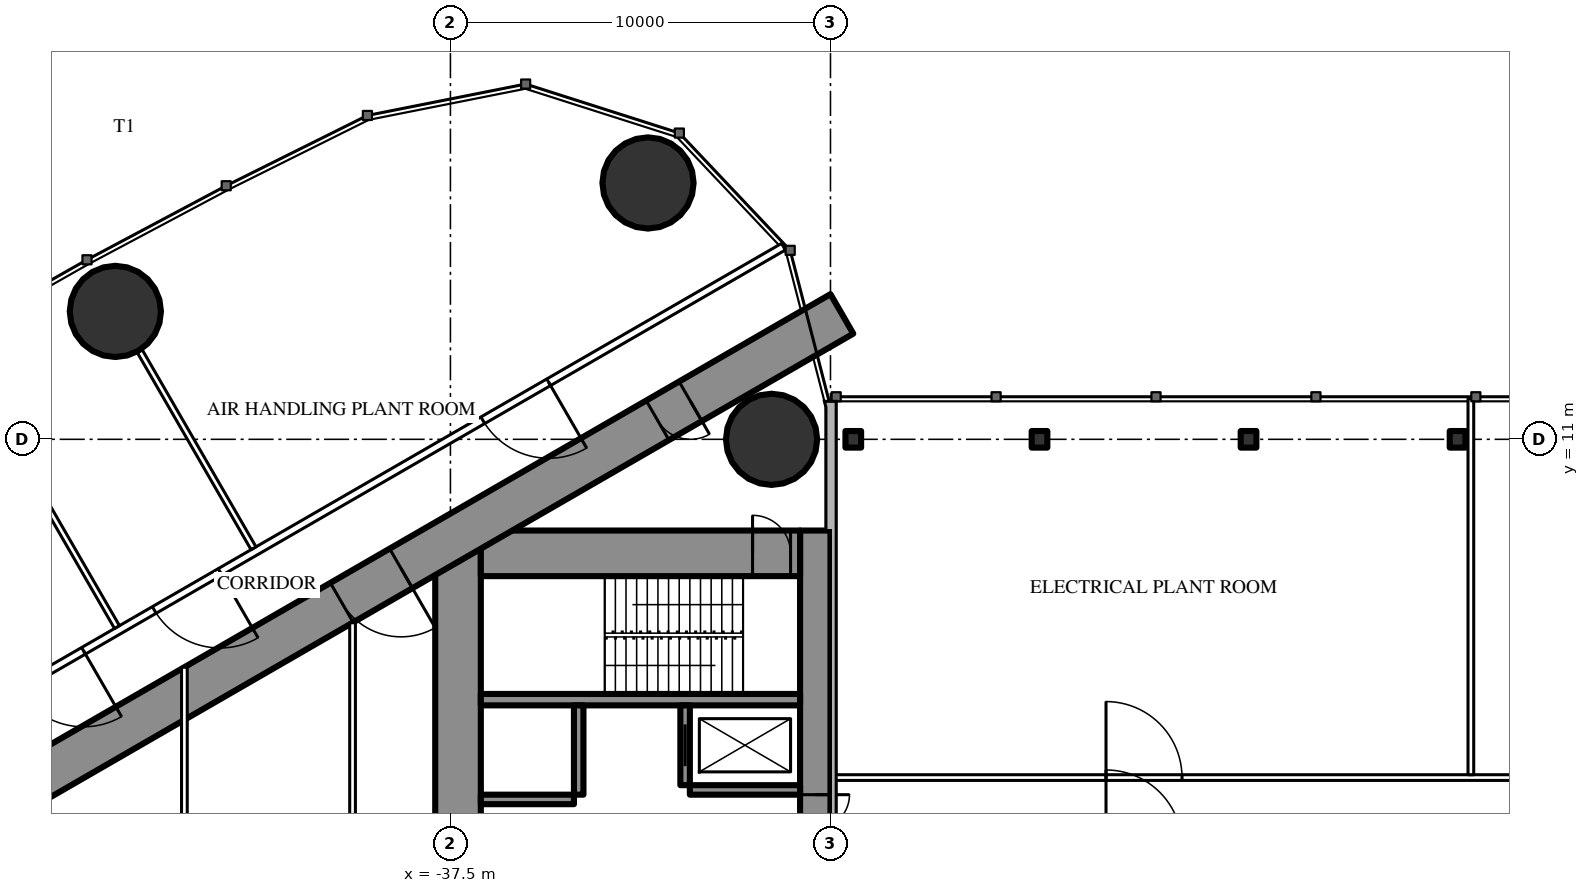
"""IFC4 building model, lengths in metres.
Left out: names, types, materials, properties, quantities, classifications, styles, units other than length and angle.
Written with IfcOpenShell. Run it as: python <this file> out.ifc"""

import sys

from ifc_helpers import new_model, si_unit, direction, frame, frame_2d, origin, origin_2d, place, context, subcontext, project, spatial, rectangle, circle, i_section, extrude, element, fill, save


model = new_model("IFC4")
c1 = context("Model", 3, precision=1e-05, world=origin(), true_north=direction((0.0, 1.0)))
c2 = subcontext(c1, "Body", "Model", "MODEL_VIEW")
j1 = project(units=[si_unit("LENGTHUNIT", "METRE"), si_unit("PLANEANGLEUNIT", "RADIAN")], contexts=[c1])
p1 = place(None, origin())
s1 = spatial("IfcSite", under=j1, at=p1, CompositionType="ELEMENT")
p2 = place(p1, origin())
s2 = spatial("IfcBuilding", under=s1, at=p2, CompositionType="ELEMENT")
p3 = place(p2, frame((0.0, 0.0, 263.3)))
s3 = spatial("IfcBuildingStorey", under=s2, at=p3, CompositionType="ELEMENT", Elevation=263.3)
for number, where, z_axis, x_axis in (
    (1, (-32.301, 17.745, 0.0), (0.0, 0.0, 1.0), (1.0, 0.0, 0.0)),
    (2, (-29.05, 11.0, 0.0), (0.0, 0.0, 1.0), (1.0, 0.0, 0.0)),
    (3, (-46.317, 14.365, 0.0), (0.0, 0.0, 1.0), (1.0, 0.0, 0.0)),
):
    element("IfcColumn", number, at=place(p3, frame(where, z_axis=z_axis, x_axis=x_axis)), inside=s3, PredefinedType="COLUMN", context=c2, shape_type="SweptSolid", body=[
        extrude(circle(Radius=1.2, at=origin_2d()), origin(), (0.0, 0.0, 1.0), 5.0),
    ])
p4 = place(p3, frame((-27.9, 8.6, 0.0), z_axis=(0.0, 0.0, 1.0), x_axis=(0.0, -1.0, 0.0)))
e4 = element("IfcWall", 4, at=p4, inside=s3, PredefinedType="SHEAR", context=c2, shape_type="SweptSolid", body=[
    extrude(rectangle(XDim=17.2, YDim=0.8, at=frame_2d((8.6, 0.0))), origin(), (0.0, 0.0, 1.0), 5.0),
])
p5 = place(p4, frame((6.95, 0.0, 0.0)))
e5 = element("IfcOpeningElement", 5, at=p5, cuts=e4, PredefinedType="OPENING", context=c2, shape_type="SweptSolid", body=[
    extrude(rectangle(XDim=0.9, YDim=2.2, at=frame_2d((0.45, 1.1))), frame((0.0, 0.41, 0.0), z_axis=(0.0, -1.0, 0.0), x_axis=(1.0, 0.0, 0.0)), (0.0, 0.0, 1.0), 0.82),
])
p6 = place(p3, frame((-37.3, 8.6, 0.0), z_axis=(0.0, 0.0, 1.0), x_axis=(0.0, -1.0, 0.0)))
e6 = element("IfcWall", 6, at=p6, inside=s3, PredefinedType="SHEAR", context=c2, shape_type="SweptSolid", body=[
    extrude(rectangle(XDim=17.2, YDim=1.2, at=frame_2d((8.6, 0.0))), origin(), (0.0, 0.0, 1.0), 5.0),
])
p7 = place(p6, frame((7.7, 0.0, 0.0)))
e7 = element("IfcOpeningElement", 7, at=p7, cuts=e6, PredefinedType="OPENING", context=c2, shape_type="SweptSolid", body=[
    extrude(rectangle(XDim=1.8, YDim=2.2, at=frame_2d((0.9, 1.1))), frame((0.0, 0.61, 0.0), z_axis=(0.0, -1.0, 0.0), x_axis=(1.0, 0.0, 0.0)), (0.0, 0.0, 1.0), 1.22),
])
p8 = place(p3, frame((-28.3, 8.0, 0.0), z_axis=(0.0, 0.0, 1.0), x_axis=(-1.0, 0.0, 0.0)))
e8 = element("IfcWall", 8, at=p8, inside=s3, PredefinedType="SHEAR", context=c2, shape_type="SweptSolid", body=[
    extrude(rectangle(XDim=8.4, YDim=1.2, at=frame_2d((4.2, 0.0))), origin(), (0.0, 0.0, 1.0), 5.0),
])
p9 = place(p8, frame((0.25, 0.0, 0.0)))
e9 = element("IfcOpeningElement", 9, at=p9, cuts=e8, PredefinedType="OPENING", context=c2, shape_type="SweptSolid", body=[
    extrude(rectangle(XDim=1.0, YDim=2.2, at=frame_2d((0.5, 1.1))), frame((0.0, 0.61, 0.0), z_axis=(0.0, -1.0, 0.0), x_axis=(1.0, 0.0, 0.0)), (0.0, 0.0, 1.0), 1.22),
])
p10 = place(p3, frame((-28.3, 4.15, 0.0), z_axis=(0.0, 0.0, 1.0), x_axis=(-1.0, 0.0, 0.0)))
e10 = element("IfcWall", 10, at=p10, inside=s3, PredefinedType="SHEAR", context=c2, shape_type="SweptSolid", body=[
    extrude(rectangle(XDim=8.4, YDim=0.3, at=frame_2d((4.2, 0.0))), origin(), (0.0, 0.0, 1.0), 5.0),
])
p11 = place(p3, frame((-31.325, 4.0, 0.0), z_axis=(0.0, 0.0, 1.0), x_axis=(0.0, -1.0, 0.0)))
e11 = element("IfcWall", 11, at=p11, inside=s3, PredefinedType="SHEAR", context=c2, shape_type="SweptSolid", body=[
    extrude(rectangle(XDim=2.1, YDim=0.25, at=frame_2d((1.05, 0.0))), origin(), (0.0, 0.0, 1.0), 5.0),
])
p12 = place(p11, frame((0.5, 0.0, 0.0)))
e12 = element("IfcOpeningElement", 12, at=p12, cuts=e11, PredefinedType="OPENING", context=c2, shape_type="SweptSolid", body=[
    extrude(rectangle(XDim=1.1, YDim=2.2, at=frame_2d((0.55, 1.1))), frame((0.0, 0.135, 0.0), z_axis=(0.0, -1.0, 0.0), x_axis=(1.0, 0.0, 0.0)), (0.0, 0.0, 1.0), 0.27),
])
p13 = place(p3, frame((-34.125, 4.0, 0.0), z_axis=(0.0, 0.0, 1.0), x_axis=(0.0, -1.0, 0.0)))
e13 = element("IfcWall", 13, at=p13, inside=s3, PredefinedType="SHEAR", context=c2, shape_type="SweptSolid", body=[
    extrude(rectangle(XDim=2.35, YDim=0.25, at=frame_2d((1.175, 0.0))), origin(), (0.0, 0.0, 1.0), 5.0),
])
p14 = place(p3, frame((-28.3, 1.775, 0.0), z_axis=(0.0, 0.0, 1.0), x_axis=(-1.0, 0.0, 0.0)))
e14 = element("IfcWall", 14, at=p14, inside=s3, PredefinedType="SHEAR", context=c2, shape_type="SweptSolid", body=[
    extrude(rectangle(XDim=2.9, YDim=0.25, at=frame_2d((1.45, 0.0))), origin(), (0.0, 0.0, 1.0), 5.0),
])
p15 = place(p3, frame((-34.25, 1.525, 0.0), z_axis=(0.0, 0.0, 1.0), x_axis=(-1.0, 0.0, 0.0)))
e15 = element("IfcWall", 15, at=p15, inside=s3, PredefinedType="SHEAR", context=c2, shape_type="SweptSolid", body=[
    extrude(rectangle(XDim=2.45, YDim=0.25, at=frame_2d((1.225, 0.0))), origin(), (0.0, 0.0, 1.0), 5.0),
])
p16 = place(p3, frame((-27.2, 14.3, 0.0), z_axis=(0.0, 0.0, 1.0), x_axis=(-0.866026593062, -0.499997940104, 0.0)))
e16 = element("IfcWall", 16, at=p16, inside=s3, PredefinedType="SHEAR", context=c2, shape_type="SweptSolid", body=[
    extrude(rectangle(XDim=28.946, YDim=1.2, at=frame_2d((14.473, 0.0))), origin(), (0.0, 0.0, 1.0), 5.0),
])
p17 = place(p16, frame((4.6, 0.0, 0.0)))
e17 = element("IfcOpeningElement", 17, at=p17, cuts=e16, PredefinedType="OPENING", context=c2, shape_type="SweptSolid", body=[
    extrude(rectangle(XDim=1.0, YDim=2.2, at=frame_2d((0.5, 1.1))), frame((0.0, 0.61, 0.0), z_axis=(0.0, -1.0, 0.0), x_axis=(1.0, 0.0, 0.0)), (0.0, 0.0, 1.0), 1.22),
])
p18 = place(p16, frame((13.395, 0.0, 0.0)))
e18 = element("IfcOpeningElement", 18, at=p18, cuts=e16, PredefinedType="OPENING", context=c2, shape_type="SweptSolid", body=[
    extrude(rectangle(XDim=1.8, YDim=2.2, at=frame_2d((0.9, 1.1))), frame((0.0, 0.61, 0.0), z_axis=(0.0, -1.0, 0.0), x_axis=(1.0, 0.0, 0.0)), (0.0, 0.0, 1.0), 1.22),
])
for number, where, z_axis, x_axis in (
    (19, (-26.9, 11.0, 0.0), (0.0, 0.0, 1.0), (1.0, 0.0, 0.0)),
    (20, (-22.0, 11.0, 0.0), (0.0, 0.0, 1.0), (1.0, 0.0, 0.0)),
    (21, (-16.5, 11.0, 0.0), (0.0, 0.0, 1.0), (1.0, 0.0, 0.0)),
    (22, (-11.0, 11.0, 0.0), (0.0, 0.0, 1.0), (1.0, 0.0, 0.0)),
):
    element("IfcColumn", number, at=place(p3, frame(where, z_axis=z_axis, x_axis=x_axis)), inside=s3, PredefinedType="COLUMN", context=c2, shape_type="SweptSolid", body=[
        extrude(i_section(OverallWidth=0.412, OverallDepth=0.437, WebThickness=0.036, FlangeThickness=0.058, FilletRadius=0.015, at=origin_2d()), origin(), (0.0, 0.0, 1.0), 5.0),
    ])
p19 = place(p3, frame((-28.737, 16.068, 0.0), z_axis=(0.0, 0.0, 1.0), x_axis=(-0.866026057212, -0.499998868229, 0.0)))
e23 = element("IfcWall", 23, at=p19, inside=s3, PredefinedType="PARTITIONING", context=c2, shape_type="SweptSolid", body=[
    extrude(rectangle(XDim=32.137, YDim=0.2, at=frame_2d((16.068, 0.0))), origin(), (0.0, 0.0, 1.0), 4.75),
])
p20 = place(p19, frame((7.134, 0.0, 0.0)))
e24 = element("IfcOpeningElement", 24, at=p20, cuts=e23, PredefinedType="OPENING", context=c2, shape_type="SweptSolid", body=[
    extrude(rectangle(XDim=2.0, YDim=2.4, at=frame_2d((1.0, 1.2))), frame((0.0, 0.11, 0.0), z_axis=(0.0, -1.0, 0.0), x_axis=(1.0, 0.0, 0.0)), (0.0, 0.0, 1.0), 0.22),
])
p21 = place(p19, frame((17.117, 0.0, 0.0)))
e25 = element("IfcOpeningElement", 25, at=p21, cuts=e23, PredefinedType="OPENING", context=c2, shape_type="SweptSolid", body=[
    extrude(rectangle(XDim=2.0, YDim=2.4, at=frame_2d((1.0, 1.2))), frame((0.0, 0.11, 0.0), z_axis=(0.0, -1.0, 0.0), x_axis=(1.0, 0.0, 0.0)), (0.0, 0.0, 1.0), 0.22),
])
p22 = place(p19, frame((21.266, 0.0, 0.0)))
e26 = element("IfcOpeningElement", 26, at=p22, cuts=e23, PredefinedType="OPENING", context=c2, shape_type="SweptSolid", body=[
    extrude(rectangle(XDim=2.0, YDim=2.4, at=frame_2d((1.0, 1.2))), frame((0.0, 0.11, 0.0), z_axis=(0.0, -1.0, 0.0), x_axis=(1.0, 0.0, 0.0)), (0.0, 0.0, 1.0), 0.22),
])
p23 = place(p19, frame((27.126, 0.0, 0.0)))
e27 = element("IfcOpeningElement", 27, at=p23, cuts=e23, PredefinedType="OPENING", context=c2, shape_type="SweptSolid", body=[
    extrude(rectangle(XDim=2.0, YDim=2.4, at=frame_2d((1.0, 1.2))), frame((0.0, 0.11, 0.0), z_axis=(0.0, -1.0, 0.0), x_axis=(1.0, 0.0, 0.0)), (0.0, 0.0, 1.0), 0.22),
])
p24 = place(p3, frame((-42.68, 8.134, 0.0), z_axis=(0.0, 0.0, 1.0), x_axis=(-0.499984479505, 0.866034364361, 0.0)))
e28 = element("IfcWall", 28, at=p24, inside=s3, PredefinedType="PARTITIONING", context=c2, shape_type="SweptSolid", body=[
    extrude(rectangle(XDim=5.995, YDim=0.15, at=frame_2d((2.998, 0.0))), origin(), (0.0, 0.0, 1.0), 3.85),
])
p25 = place(p3, frame((-46.274, 6.059, 0.0), z_axis=(0.0, 0.0, 1.0), x_axis=(-0.500020471368, 0.866013584312, 0.0)))
e29 = element("IfcWall", 29, at=p25, inside=s3, PredefinedType="PARTITIONING", context=c2, shape_type="SweptSolid", body=[
    extrude(rectangle(XDim=6.028, YDim=0.15, at=frame_2d((3.014, 0.0))), origin(), (0.0, 0.0, 1.0), 3.85),
])
p26 = place(p3, frame((-40.075, 6.174, 0.0), z_axis=(0.0, 0.0, 1.0), x_axis=(0.0, -1.0, 0.0)))
e30 = element("IfcWall", 30, at=p26, inside=s3, PredefinedType="PARTITIONING", context=c2, shape_type="SweptSolid", body=[
    extrude(rectangle(XDim=12.348, YDim=0.15, at=frame_2d((6.174, 0.0))), origin(), (0.0, 0.0, 1.0), 4.75),
])
p27 = place(p26, frame((5.274, 0.0, 0.0)))
e31 = element("IfcOpeningElement", 31, at=p27, cuts=e30, PredefinedType="OPENING", context=c2, shape_type="SweptSolid", body=[
    extrude(rectangle(XDim=1.8, YDim=2.2, at=frame_2d((0.9, 1.1))), frame((0.0, 0.085, 0.0), z_axis=(0.0, -1.0, 0.0), x_axis=(1.0, 0.0, 0.0)), (0.0, 0.0, 1.0), 0.17),
])
p28 = place(p3, frame((-44.5, 5.005, 0.0), z_axis=(0.0, 0.0, 1.0), x_axis=(0.0, -1.0, 0.0)))
e32 = element("IfcWall", 32, at=p28, inside=s3, PredefinedType="PARTITIONING", context=c2, shape_type="SweptSolid", body=[
    extrude(rectangle(XDim=10.009, YDim=0.15, at=frame_2d((5.005, 0.0))), origin(), (0.0, 0.0, 1.0), 3.9),
])
p29 = place(p28, frame((4.505, 0.0, 0.0)))
e33 = element("IfcOpeningElement", 33, at=p29, cuts=e32, PredefinedType="OPENING", context=c2, shape_type="SweptSolid", body=[
    extrude(rectangle(XDim=1.0, YDim=2.2, at=frame_2d((0.5, 1.1))), frame((0.0, 0.085, 0.0), z_axis=(0.0, -1.0, 0.0), x_axis=(1.0, 0.0, 0.0)), (0.0, 0.0, 1.0), 0.17),
])
p30 = place(p3, frame((-27.5, 2.1, 0.0), z_axis=(0.0, 0.0, 1.0), x_axis=(1.0, 0.0, 0.0)))
e34 = element("IfcWall", 34, at=p30, inside=s3, PredefinedType="PARTITIONING", context=c2, shape_type="SweptSolid", body=[
    extrude(rectangle(XDim=55.0, YDim=0.15, at=frame_2d((27.5, 0.0))), origin(), (0.0, 0.0, 1.0), 4.8),
])
p31 = place(p30, frame((7.25, 0.0, 0.0)))
e35 = element("IfcOpeningElement", 35, at=p31, cuts=e34, PredefinedType="OPENING", context=c2, shape_type="SweptSolid", body=[
    extrude(rectangle(XDim=2.0, YDim=2.4, at=frame_2d((1.0, 1.2))), frame((0.0, 0.085, 0.0), z_axis=(0.0, -1.0, 0.0), x_axis=(1.0, 0.0, 0.0)), (0.0, 0.0, 1.0), 0.17),
])
p32 = place(p30, frame((29.25, 0.0, 0.0)))
e36 = element("IfcOpeningElement", 36, at=p32, cuts=e34, PredefinedType="OPENING", context=c2, shape_type="SweptSolid", body=[
    extrude(rectangle(XDim=2.0, YDim=2.4, at=frame_2d((1.0, 1.2))), frame((0.0, 0.085, 0.0), z_axis=(0.0, -1.0, 0.0), x_axis=(1.0, 0.0, 0.0)), (0.0, 0.0, 1.0), 0.17),
])
p33 = place(p30, frame((45.75, 0.0, 0.0)))
e37 = element("IfcOpeningElement", 37, at=p33, cuts=e34, PredefinedType="OPENING", context=c2, shape_type="SweptSolid", body=[
    extrude(rectangle(XDim=2.0, YDim=2.4, at=frame_2d((1.0, 1.2))), frame((0.0, 0.085, 0.0), z_axis=(0.0, -1.0, 0.0), x_axis=(1.0, 0.0, 0.0)), (0.0, 0.0, 1.0), 0.17),
])
p34 = place(p3, frame((-10.65, 2.175, 0.0), z_axis=(0.0, 0.0, 1.0), x_axis=(0.0, 1.0, 0.0)))
e38 = element("IfcWall", 38, at=p34, inside=s3, PredefinedType="PARTITIONING", context=c2, shape_type="SweptSolid", body=[
    extrude(rectangle(XDim=9.895, YDim=0.15, at=frame_2d((4.948, 0.0))), origin(), (0.0, 0.0, 1.0), 4.8),
])
p35 = place(p20, origin())
e39 = element("IfcDoor", 39, at=p35, inside=s3, OperationType="DOUBLE_DOOR_SINGLE_SWING", PredefinedType="DOOR", context=c2, shape_type="SweptSolid", body=[
    extrude(rectangle(XDim=2.0, YDim=2.4, at=frame_2d((1.0, 1.2))), frame((0.0, 0.025, 0.0), z_axis=(0.0, -1.0, 0.0), x_axis=(1.0, 0.0, 0.0)), (0.0, 0.0, 1.0), 0.05),
])
fill(e24, e39)
p36 = place(p21, origin())
e40 = element("IfcDoor", 40, at=p36, inside=s3, OperationType="DOUBLE_DOOR_SINGLE_SWING", PredefinedType="DOOR", context=c2, shape_type="SweptSolid", body=[
    extrude(rectangle(XDim=2.0, YDim=2.4, at=frame_2d((1.0, 1.2))), frame((0.0, 0.025, 0.0), z_axis=(0.0, -1.0, 0.0), x_axis=(1.0, 0.0, 0.0)), (0.0, 0.0, 1.0), 0.05),
])
fill(e25, e40)
p37 = place(p22, origin())
e41 = element("IfcDoor", 41, at=p37, inside=s3, OperationType="DOUBLE_DOOR_SINGLE_SWING", PredefinedType="DOOR", context=c2, shape_type="SweptSolid", body=[
    extrude(rectangle(XDim=2.0, YDim=2.4, at=frame_2d((1.0, 1.2))), frame((0.0, 0.025, 0.0), z_axis=(0.0, -1.0, 0.0), x_axis=(1.0, 0.0, 0.0)), (0.0, 0.0, 1.0), 0.05),
])
fill(e26, e41)
p38 = place(p17, origin())
e42 = element("IfcDoor", 42, at=p38, inside=s3, OperationType="SINGLE_SWING_LEFT", PredefinedType="DOOR", context=c2, shape_type="SweptSolid", body=[
    extrude(rectangle(XDim=1.0, YDim=2.2, at=frame_2d((0.5, 1.1))), frame((0.0, 0.025, 0.0), z_axis=(0.0, -1.0, 0.0), x_axis=(1.0, 0.0, 0.0)), (0.0, 0.0, 1.0), 0.05),
])
fill(e17, e42)
p39 = place(p18, origin())
e43 = element("IfcDoor", 43, at=p39, inside=s3, OperationType="DOUBLE_DOOR_SINGLE_SWING", PredefinedType="DOOR", context=c2, shape_type="SweptSolid", body=[
    extrude(rectangle(XDim=1.8, YDim=2.2, at=frame_2d((0.9, 1.1))), frame((0.0, 0.025, 0.0), z_axis=(0.0, -1.0, 0.0), x_axis=(1.0, 0.0, 0.0)), (0.0, 0.0, 1.0), 0.05),
])
fill(e18, e43)
p40 = place(p9, origin())
e44 = element("IfcDoor", 44, at=p40, inside=s3, OperationType="SINGLE_SWING_RIGHT", PredefinedType="DOOR", context=c2, shape_type="SweptSolid", body=[
    extrude(rectangle(XDim=1.0, YDim=2.2, at=frame_2d((0.5, 1.1))), frame((0.0, 0.025, 0.0), z_axis=(0.0, -1.0, 0.0), x_axis=(1.0, 0.0, 0.0)), (0.0, 0.0, 1.0), 0.05),
])
fill(e9, e44)
p41 = place(p5, origin())
e45 = element("IfcDoor", 45, at=p41, inside=s3, OperationType="SINGLE_SWING_LEFT", PredefinedType="DOOR", context=c2, shape_type="SweptSolid", body=[
    extrude(rectangle(XDim=0.9, YDim=2.2, at=frame_2d((0.45, 1.1))), frame((0.0, 0.025, 0.0), z_axis=(0.0, -1.0, 0.0), x_axis=(1.0, 0.0, 0.0)), (0.0, 0.0, 1.0), 0.05),
])
fill(e5, e45)
p42 = place(p31, origin())
e46 = element("IfcDoor", 46, at=p42, inside=s3, OperationType="DOUBLE_DOOR_SINGLE_SWING", PredefinedType="DOOR", context=c2, shape_type="SweptSolid", body=[
    extrude(rectangle(XDim=2.0, YDim=2.4, at=frame_2d((1.0, 1.2))), frame((0.0, 0.025, 0.0), z_axis=(0.0, -1.0, 0.0), x_axis=(1.0, 0.0, 0.0)), (0.0, 0.0, 1.0), 0.05),
])
fill(e35, e46)
p43 = place(p12, origin())
e47 = element("IfcDoor", 47, at=p43, inside=s3, OperationType="SLIDING_TO_LEFT", PredefinedType="USERDEFINED", context=c2, shape_type="SweptSolid", body=[
    extrude(rectangle(XDim=1.1, YDim=2.2, at=frame_2d((0.55, 1.1))), frame((0.0, 0.025, 0.0), z_axis=(0.0, -1.0, 0.0), x_axis=(1.0, 0.0, 0.0)), (0.0, 0.0, 1.0), 0.05),
])
fill(e12, e47)
save(model, sys.argv[1])
